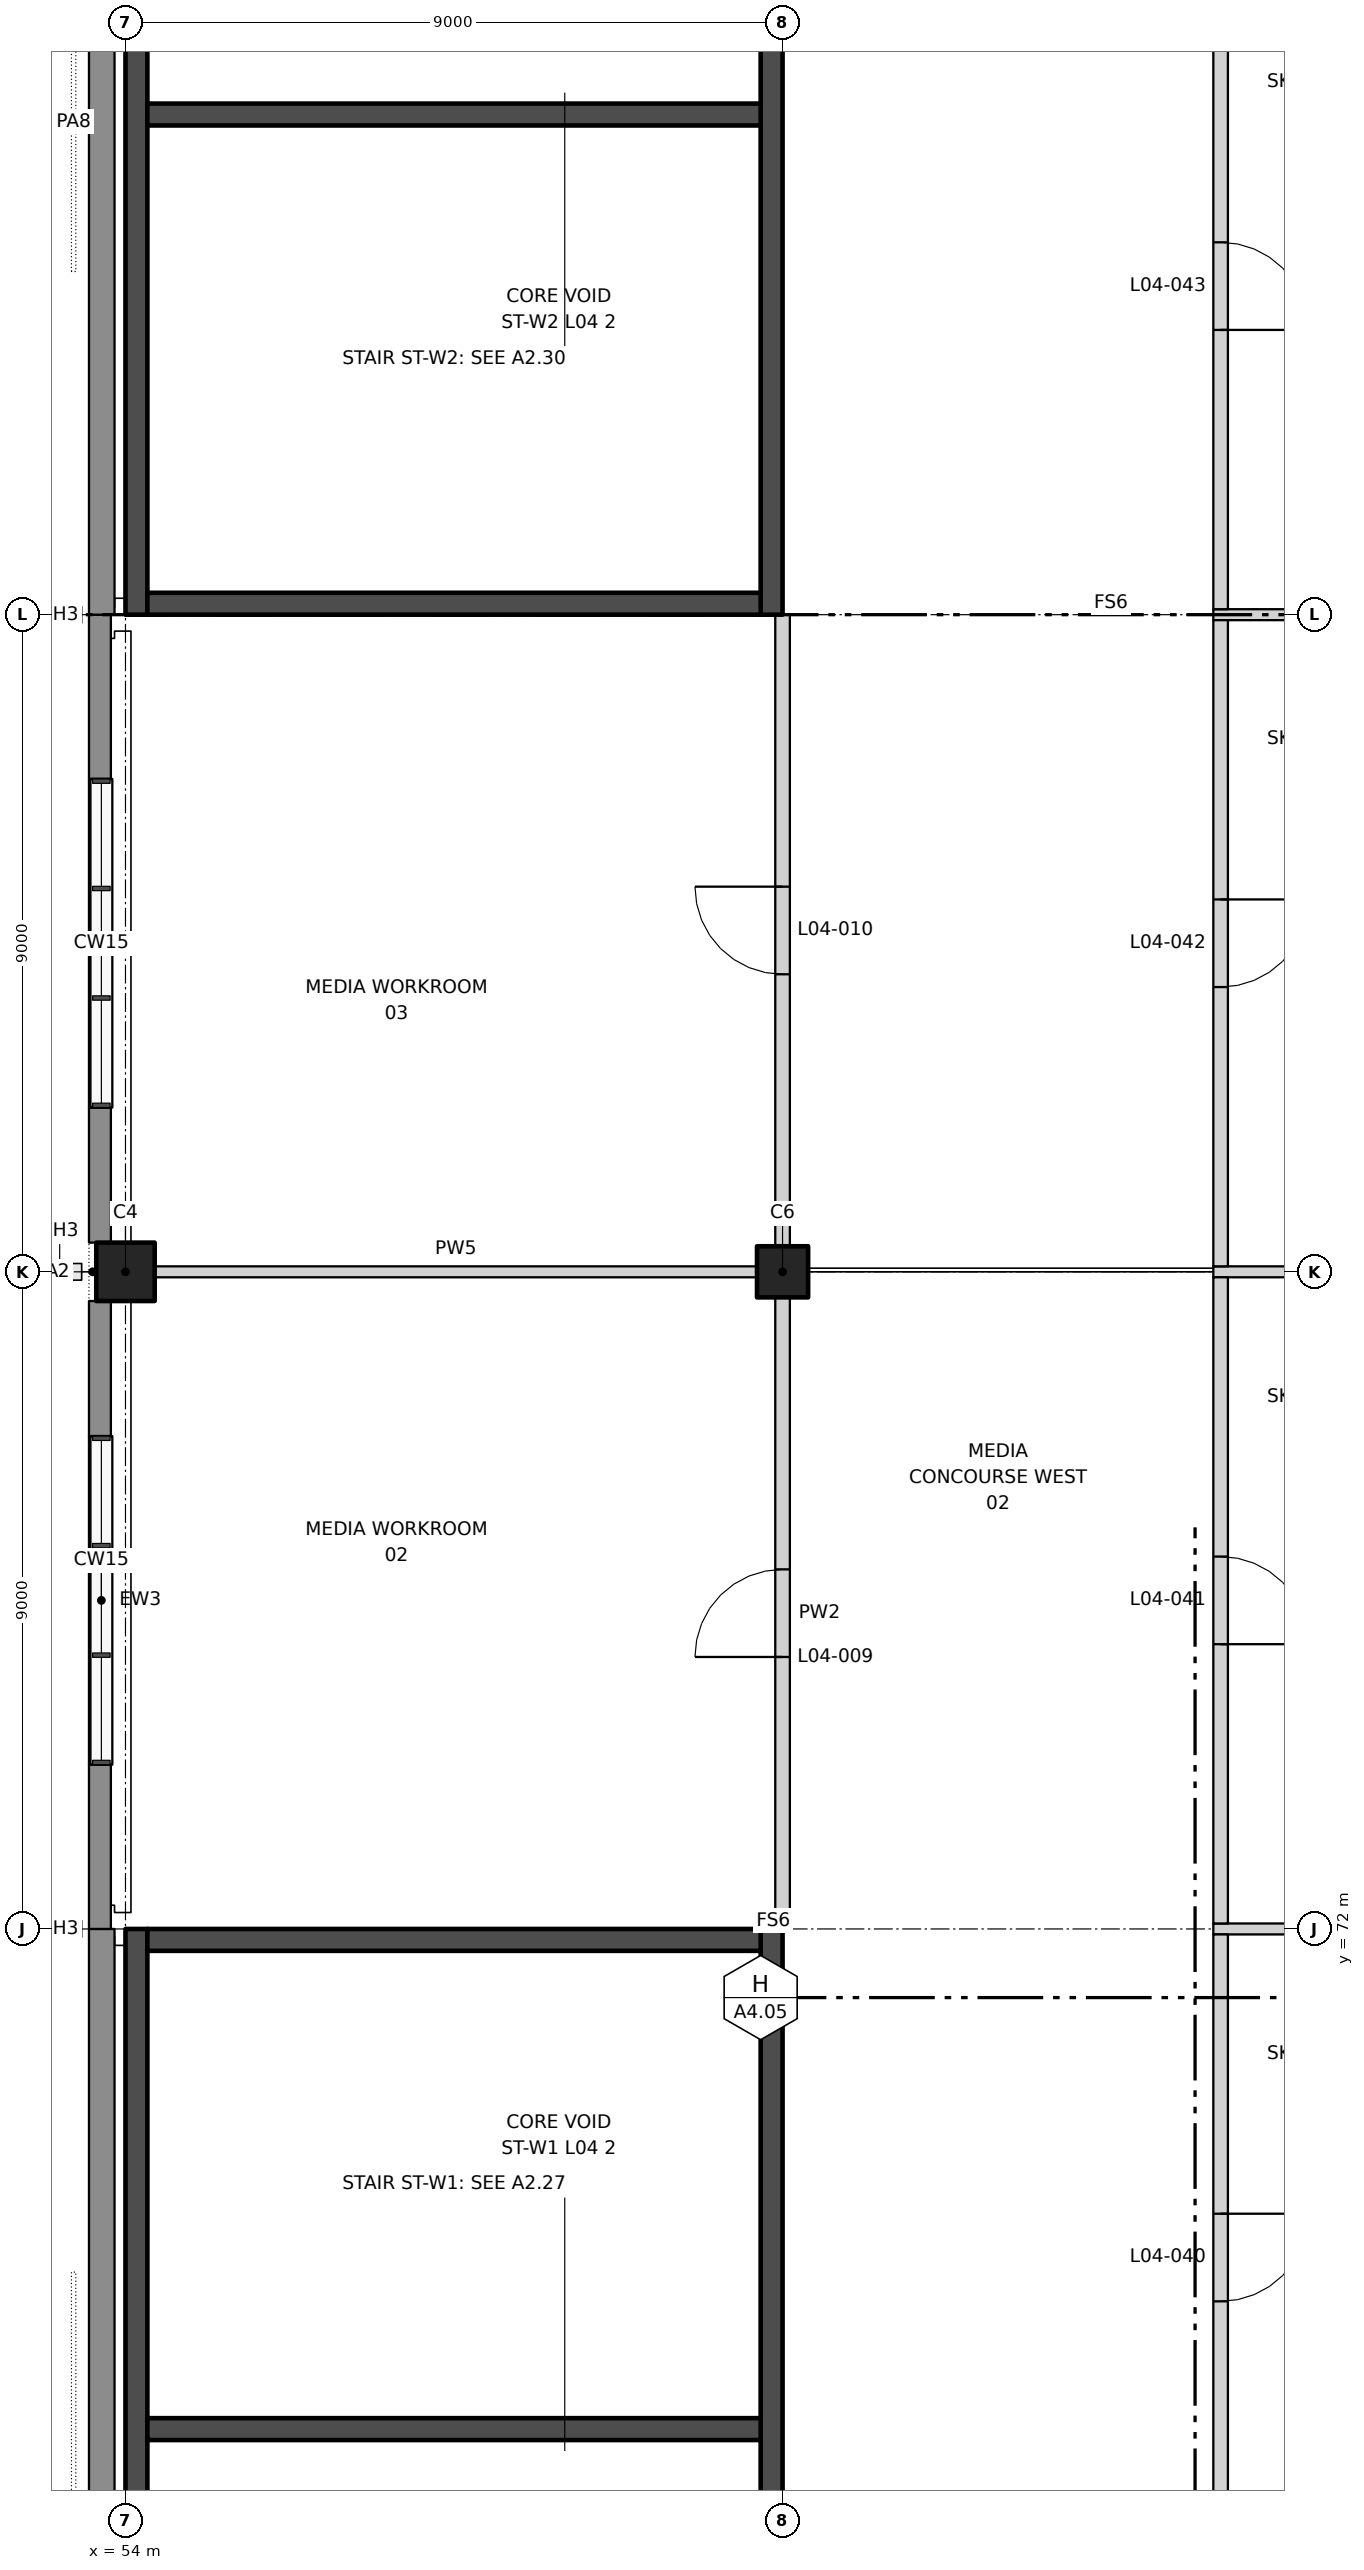
"""IFC4 building model, lengths in metres.
Left out: names, types, materials, properties, quantities, classifications, styles, units other than length and angle.
Written with IfcOpenShell. Run it as: python <this file> out.ifc"""

import sys

from ifc_helpers import new_model, si_unit, direction, frame, frame_2d, origin, origin_2d, place, context, subcontext, project, spatial, rectangle, extrude, element, fill, save


model = new_model("IFC4")
c1 = context("Model", 3, precision=1e-05, world=origin(), true_north=direction((0.0, 1.0)))
c2 = subcontext(c1, "Body", "Model", "MODEL_VIEW")
j1 = project(units=[si_unit("LENGTHUNIT", "METRE"), si_unit("PLANEANGLEUNIT", "RADIAN")], contexts=[c1])
p1 = place(None, origin())
s1 = spatial("IfcSite", under=j1, at=p1, CompositionType="ELEMENT")
p2 = place(p1, origin())
s2 = spatial("IfcBuilding", under=s1, at=p2, CompositionType="ELEMENT")
p3 = place(p2, frame((0.0, 0.0, 28.0)))
s3 = spatial("IfcBuildingStorey", under=s2, at=p3, CompositionType="ELEMENT", Elevation=28.0)
p4 = place(p3, frame((54.0, 81.0, 0.0), z_axis=(0.0, 0.0, 1.0), x_axis=(1.0, 0.0, 0.0)))
e1 = element("IfcColumn", 1, at=p4, inside=s3, PredefinedType="COLUMN", context=c2, shape_type="SweptSolid", body=[
    extrude(rectangle(XDim=0.8, YDim=0.8, at=origin_2d()), origin(), (0.0, 0.0, 1.0), 5.5),
])
p5 = place(p3, frame((63.0, 81.0, 0.0), z_axis=(0.0, 0.0, 1.0), x_axis=(1.0, 0.0, 0.0)))
e2 = element("IfcColumn", 2, at=p5, inside=s3, PredefinedType="COLUMN", context=c2, shape_type="SweptSolid", body=[
    extrude(rectangle(XDim=0.7, YDim=0.7, at=origin_2d()), origin(), (0.0, 0.0, 1.0), 5.5),
])
p6 = place(p3, frame((68.9, 72.0, 0.0), z_axis=(0.0, 0.0, 1.0), x_axis=(1.0, 0.0, 0.0)))
e3 = element("IfcWall", 3, at=p6, inside=s3, PredefinedType="PARTITIONING", context=c2, shape_type="SweptSolid", body=[
    extrude(rectangle(XDim=2.9, YDim=0.15, at=frame_2d((1.45, 0.0))), origin(), (0.0, 0.0, 1.0), 4.2),
])
p7 = place(p3, frame((54.4, 81.0, 0.0), z_axis=(0.0, 0.0, 1.0), x_axis=(1.0, 0.0, 0.0)))
e4 = element("IfcWall", 4, at=p7, inside=s3, PredefinedType="PARTITIONING", context=c2, shape_type="SweptSolid", body=[
    extrude(rectangle(XDim=8.25, YDim=0.15, at=frame_2d((4.125, 0.0))), origin(), (0.0, 0.0, 1.0), 9.5),
])
for number, where, z_axis, x_axis in (
    (5, (68.9, 81.0, 0.0), (0.0, 0.0, 1.0), (1.0, 0.0, 0.0)),
    (6, (68.9, 90.0, 0.0), (0.0, 0.0, 1.0), (1.0, 0.0, 0.0)),
):
    element("IfcWall", number, at=place(p3, frame(where, z_axis=z_axis, x_axis=x_axis)), inside=s3, PredefinedType="PARTITIONING", context=c2, shape_type="SweptSolid", body=[
        extrude(rectangle(XDim=2.9, YDim=0.15, at=frame_2d((1.45, 0.0))), origin(), (0.0, 0.0, 1.0), 4.2),
    ])
p8 = place(p3, frame((63.0, 72.0, 0.0), z_axis=(0.0, 0.0, 1.0), x_axis=(0.0, 1.0, 0.0)))
e7 = element("IfcWall", 7, at=p8, inside=s3, PredefinedType="PARTITIONING", context=c2, shape_type="SweptSolid", body=[
    extrude(rectangle(XDim=8.65, YDim=0.2, at=frame_2d((4.325, 0.0))), origin(), (0.0, 0.0, 1.0), 3.8),
])
p9 = place(p8, frame((3.725, 0.0, 0.0)))
e8 = element("IfcOpeningElement", 8, at=p9, cuts=e7, PredefinedType="OPENING", context=c2, shape_type="SweptSolid", body=[
    extrude(rectangle(XDim=1.2, YDim=2.1, at=frame_2d((0.6, 1.05))), frame((0.0, 0.11, 0.0), z_axis=(0.0, -1.0, 0.0), x_axis=(1.0, 0.0, 0.0)), (0.0, 0.0, 1.0), 0.22),
])
p10 = place(p3, frame((63.0, 81.35, 0.0), z_axis=(0.0, 0.0, 1.0), x_axis=(0.0, 1.0, 0.0)))
e9 = element("IfcWall", 9, at=p10, inside=s3, PredefinedType="PARTITIONING", context=c2, shape_type="SweptSolid", body=[
    extrude(rectangle(XDim=8.65, YDim=0.2, at=frame_2d((4.325, 0.0))), origin(), (0.0, 0.0, 1.0), 4.2),
])
p11 = place(p10, frame((3.725, 0.0, 0.0)))
e10 = element("IfcOpeningElement", 10, at=p11, cuts=e9, PredefinedType="OPENING", context=c2, shape_type="SweptSolid", body=[
    extrude(rectangle(XDim=1.2, YDim=2.1, at=frame_2d((0.6, 1.05))), frame((0.0, 0.11, 0.0), z_axis=(0.0, -1.0, 0.0), x_axis=(1.0, 0.0, 0.0)), (0.0, 0.0, 1.0), 0.22),
])
p12 = place(p3, frame((69.0, 63.075, 0.0), z_axis=(0.0, 0.0, 1.0), x_axis=(0.0, 1.0, 0.0)))
e11 = element("IfcWall", 11, at=p12, inside=s3, PredefinedType="PARTITIONING", context=c2, shape_type="SweptSolid", body=[
    extrude(rectangle(XDim=8.85, YDim=0.2, at=frame_2d((4.425, 0.0))), origin(), (0.0, 0.0, 1.0), 5.5),
])
p13 = place(p12, frame((3.825, 0.0, 0.0)))
e12 = element("IfcOpeningElement", 12, at=p13, cuts=e11, PredefinedType="OPENING", context=c2, shape_type="SweptSolid", body=[
    extrude(rectangle(XDim=1.2, YDim=2.1, at=frame_2d((0.6, 1.05))), frame((0.0, 0.11, 0.0), z_axis=(0.0, -1.0, 0.0), x_axis=(1.0, 0.0, 0.0)), (0.0, 0.0, 1.0), 0.22),
])
p14 = place(p3, frame((69.0, 72.075, 0.0), z_axis=(0.0, 0.0, 1.0), x_axis=(0.0, 1.0, 0.0)))
e13 = element("IfcWall", 13, at=p14, inside=s3, PredefinedType="PARTITIONING", context=c2, shape_type="SweptSolid", body=[
    extrude(rectangle(XDim=8.85, YDim=0.2, at=frame_2d((4.425, 0.0))), origin(), (0.0, 0.0, 1.0), 5.5),
])
p15 = place(p14, frame((3.825, 0.0, 0.0)))
e14 = element("IfcOpeningElement", 14, at=p15, cuts=e13, PredefinedType="OPENING", context=c2, shape_type="SweptSolid", body=[
    extrude(rectangle(XDim=1.2, YDim=2.1, at=frame_2d((0.6, 1.05))), frame((0.0, 0.11, 0.0), z_axis=(0.0, -1.0, 0.0), x_axis=(1.0, 0.0, 0.0)), (0.0, 0.0, 1.0), 0.22),
])
p16 = place(p3, frame((69.0, 81.075, 0.0), z_axis=(0.0, 0.0, 1.0), x_axis=(0.0, 1.0, 0.0)))
e15 = element("IfcWall", 15, at=p16, inside=s3, PredefinedType="PARTITIONING", context=c2, shape_type="SweptSolid", body=[
    extrude(rectangle(XDim=8.85, YDim=0.2, at=frame_2d((4.425, 0.0))), origin(), (0.0, 0.0, 1.0), 5.5),
])
p17 = place(p16, frame((3.825, 0.0, 0.0)))
e16 = element("IfcOpeningElement", 16, at=p17, cuts=e15, PredefinedType="OPENING", context=c2, shape_type="SweptSolid", body=[
    extrude(rectangle(XDim=1.2, YDim=2.1, at=frame_2d((0.6, 1.05))), frame((0.0, 0.11, 0.0), z_axis=(0.0, -1.0, 0.0), x_axis=(1.0, 0.0, 0.0)), (0.0, 0.0, 1.0), 0.22),
])
p18 = place(p3, frame((69.0, 90.075, 0.0), z_axis=(0.0, 0.0, 1.0), x_axis=(0.0, 1.0, 0.0)))
e17 = element("IfcWall", 17, at=p18, inside=s3, PredefinedType="PARTITIONING", context=c2, shape_type="SweptSolid", body=[
    extrude(rectangle(XDim=8.85, YDim=0.2, at=frame_2d((4.425, 0.0))), origin(), (0.0, 0.0, 1.0), 5.5),
])
p19 = place(p18, frame((3.825, 0.0, 0.0)))
e18 = element("IfcOpeningElement", 18, at=p19, cuts=e17, PredefinedType="OPENING", context=c2, shape_type="SweptSolid", body=[
    extrude(rectangle(XDim=1.2, YDim=2.1, at=frame_2d((0.6, 1.05))), frame((0.0, 0.11, 0.0), z_axis=(0.0, -1.0, 0.0), x_axis=(1.0, 0.0, 0.0)), (0.0, 0.0, 1.0), 0.22),
])
p20 = place(p3, frame((53.675, 72.0, 0.0), z_axis=(0.0, 0.0, 1.0), x_axis=(0.0, -1.0, 0.0)))
e19 = element("IfcWall", 19, at=p20, inside=s3, PredefinedType="SOLIDWALL", context=c2, shape_type="SweptSolid", body=[
    extrude(rectangle(XDim=9.0, YDim=0.35, at=frame_2d((4.5, 0.0))), origin(), (0.0, 0.0, 1.0), 5.5),
])
p21 = place(p3, frame((53.65, 74.25, 0.0), z_axis=(0.0, 0.0, 1.0), x_axis=(0.0, -1.0, 0.0)))
e20 = element("IfcWall", 20, at=p21, inside=s3, PredefinedType="SOLIDWALL", context=c2, shape_type="SweptSolid", body=[
    extrude(rectangle(XDim=2.25, YDim=0.3, at=frame_2d((1.125, 0.0))), origin(), (0.0, 0.0, 1.0), 4.9),
])
p22 = place(p3, frame((53.65, 80.6, 0.0), z_axis=(0.0, 0.0, 1.0), x_axis=(0.0, -1.0, 0.0)))
e21 = element("IfcWall", 21, at=p22, inside=s3, PredefinedType="SOLIDWALL", context=c2, shape_type="SweptSolid", body=[
    extrude(rectangle(XDim=1.85, YDim=0.3, at=frame_2d((0.925, 0.0))), origin(), (0.0, 0.0, 1.0), 4.9),
])
p23 = place(p3, frame((53.65, 78.75, 0.0), z_axis=(0.0, 0.0, 1.0), x_axis=(0.0, -1.0, 0.0)))
e22 = element("IfcWall", 22, at=p23, inside=s3, PredefinedType="SOLIDWALL", context=c2, shape_type="SweptSolid", body=[
    extrude(rectangle(XDim=4.5, YDim=0.3, at=frame_2d((2.25, 0.0))), origin(), (0.0, 0.0, 1.0), 1.0),
])
p24 = place(p3, frame((53.65, 83.25, 0.0), z_axis=(0.0, 0.0, 1.0), x_axis=(0.0, -1.0, 0.0)))
e23 = element("IfcWall", 23, at=p24, inside=s3, PredefinedType="SOLIDWALL", context=c2, shape_type="SweptSolid", body=[
    extrude(rectangle(XDim=1.85, YDim=0.3, at=frame_2d((0.925, 0.0))), origin(), (0.0, 0.0, 1.0), 4.9),
])
p25 = place(p3, frame((53.65, 90.0, 0.0), z_axis=(0.0, 0.0, 1.0), x_axis=(0.0, -1.0, 0.0)))
e24 = element("IfcWall", 24, at=p25, inside=s3, PredefinedType="SOLIDWALL", context=c2, shape_type="SweptSolid", body=[
    extrude(rectangle(XDim=2.25, YDim=0.3, at=frame_2d((1.125, 0.0))), origin(), (0.0, 0.0, 1.0), 4.9),
])
p26 = place(p3, frame((53.65, 87.75, 0.0), z_axis=(0.0, 0.0, 1.0), x_axis=(0.0, -1.0, 0.0)))
e25 = element("IfcWall", 25, at=p26, inside=s3, PredefinedType="SOLIDWALL", context=c2, shape_type="SweptSolid", body=[
    extrude(rectangle(XDim=4.5, YDim=0.3, at=frame_2d((2.25, 0.0))), origin(), (0.0, 0.0, 1.0), 1.0),
])
p27 = place(p3, frame((53.675, 99.0, 0.0), z_axis=(0.0, 0.0, 1.0), x_axis=(0.0, -1.0, 0.0)))
e26 = element("IfcWall", 26, at=p27, inside=s3, PredefinedType="SOLIDWALL", context=c2, shape_type="SweptSolid", body=[
    extrude(rectangle(XDim=9.0, YDim=0.35, at=frame_2d((4.5, 0.0))), origin(), (0.0, 0.0, 1.0), 5.5),
])
p28 = place(p3, frame((62.85, 54.0, 0.0), z_axis=(0.0, 0.0, 1.0), x_axis=(0.0, 1.0, 0.0)))
e27 = element("IfcWall", 27, at=p28, inside=s3, PredefinedType="SHEAR", context=c2, shape_type="SweptSolid", body=[
    extrude(rectangle(XDim=18.0, YDim=0.3, at=frame_2d((9.0, 0.0))), origin(), (0.0, 0.0, 1.0), 5.5),
])
p29 = place(p28, frame((1.5, 0.0, 0.0)))
e28 = element("IfcOpeningElement", 28, at=p29, cuts=e27, PredefinedType="OPENING", context=c2, shape_type="SweptSolid", body=[
    extrude(rectangle(XDim=1.2, YDim=2.1, at=frame_2d((0.6, 1.05))), frame((0.0, 0.16, 0.0), z_axis=(0.0, -1.0, 0.0), x_axis=(1.0, 0.0, 0.0)), (0.0, 0.0, 1.0), 0.32),
])
p30 = place(p3, frame((54.15, 54.0, 0.0), z_axis=(0.0, 0.0, 1.0), x_axis=(0.0, 1.0, 0.0)))
e29 = element("IfcWall", 29, at=p30, inside=s3, PredefinedType="SHEAR", context=c2, shape_type="SweptSolid", body=[
    extrude(rectangle(XDim=18.0, YDim=0.3, at=frame_2d((9.0, 0.0))), origin(), (0.0, 0.0, 1.0), 5.5),
])
for number, where, z_axis, x_axis in (
    (30, (62.7, 71.85, 0.0), (0.0, 0.0, 1.0), (-1.0, 0.0, 0.0)),
    (31, (62.7, 65.15, 0.0), (0.0, 0.0, 1.0), (-1.0, 0.0, 0.0)),
):
    element("IfcWall", number, at=place(p3, frame(where, z_axis=z_axis, x_axis=x_axis)), inside=s3, PredefinedType="SHEAR", context=c2, shape_type="SweptSolid", body=[
        extrude(rectangle(XDim=8.4, YDim=0.3, at=frame_2d((4.2, 0.0))), origin(), (0.0, 0.0, 1.0), 5.5),
    ])
p31 = place(p3, frame((62.85, 108.0, 0.0), z_axis=(0.0, 0.0, 1.0), x_axis=(0.0, -1.0, 0.0)))
e32 = element("IfcWall", 32, at=p31, inside=s3, PredefinedType="SHEAR", context=c2, shape_type="SweptSolid", body=[
    extrude(rectangle(XDim=18.0, YDim=0.3, at=frame_2d((9.0, 0.0))), origin(), (0.0, 0.0, 1.0), 5.5),
])
p32 = place(p31, frame((1.5, 0.0, 0.0)))
e33 = element("IfcOpeningElement", 33, at=p32, cuts=e32, PredefinedType="OPENING", context=c2, shape_type="SweptSolid", body=[
    extrude(rectangle(XDim=1.2, YDim=2.1, at=frame_2d((0.6, 1.05))), frame((0.0, 0.16, 0.0), z_axis=(0.0, -1.0, 0.0), x_axis=(1.0, 0.0, 0.0)), (0.0, 0.0, 1.0), 0.32),
])
p33 = place(p3, frame((54.15, 108.0, 0.0), z_axis=(0.0, 0.0, 1.0), x_axis=(0.0, -1.0, 0.0)))
e34 = element("IfcWall", 34, at=p33, inside=s3, PredefinedType="SHEAR", context=c2, shape_type="SweptSolid", body=[
    extrude(rectangle(XDim=18.0, YDim=0.3, at=frame_2d((9.0, 0.0))), origin(), (0.0, 0.0, 1.0), 5.5),
])
for number, where, z_axis, x_axis in (
    (35, (62.7, 90.15, 0.0), (0.0, 0.0, 1.0), (-1.0, 0.0, 0.0)),
    (36, (62.7, 96.85, 0.0), (0.0, 0.0, 1.0), (-1.0, 0.0, 0.0)),
):
    element("IfcWall", number, at=place(p3, frame(where, z_axis=z_axis, x_axis=x_axis)), inside=s3, PredefinedType="SHEAR", context=c2, shape_type="SweptSolid", body=[
        extrude(rectangle(XDim=8.4, YDim=0.3, at=frame_2d((4.2, 0.0))), origin(), (0.0, 0.0, 1.0), 5.5),
    ])
p34 = place(p9, origin())
e37 = element("IfcDoor", 37, at=p34, inside=s3, OperationType="SINGLE_SWING_LEFT", PredefinedType="DOOR", context=c2, shape_type="SweptSolid", body=[
    extrude(rectangle(XDim=1.2, YDim=2.1, at=frame_2d((0.6, 1.05))), frame((0.0, 0.025, 0.0), z_axis=(0.0, -1.0, 0.0), x_axis=(1.0, 0.0, 0.0)), (0.0, 0.0, 1.0), 0.05),
])
fill(e8, e37)
p35 = place(p11, origin())
e38 = element("IfcDoor", 38, at=p35, inside=s3, OperationType="SINGLE_SWING_RIGHT", PredefinedType="DOOR", context=c2, shape_type="SweptSolid", body=[
    extrude(rectangle(XDim=1.2, YDim=2.1, at=frame_2d((0.6, 1.05))), frame((0.0, 0.025, 0.0), z_axis=(0.0, -1.0, 0.0), x_axis=(1.0, 0.0, 0.0)), (0.0, 0.0, 1.0), 0.05),
])
fill(e10, e38)
p36 = place(p13, frame((1.2, 0.0, 0.0), z_axis=(0.0, 0.0, 1.0), x_axis=(-1.0, 0.0, 0.0)))
e39 = element("IfcDoor", 39, at=p36, inside=s3, OperationType="SINGLE_SWING_LEFT", PredefinedType="DOOR", context=c2, shape_type="SweptSolid", body=[
    extrude(rectangle(XDim=1.2, YDim=2.1, at=frame_2d((0.6, 1.05))), frame((0.0, 0.025, 0.0), z_axis=(0.0, -1.0, 0.0), x_axis=(1.0, 0.0, 0.0)), (0.0, 0.0, 1.0), 0.05),
])
fill(e12, e39)
p37 = place(p15, frame((1.2, 0.0, 0.0), z_axis=(0.0, 0.0, 1.0), x_axis=(-1.0, 0.0, 0.0)))
e40 = element("IfcDoor", 40, at=p37, inside=s3, OperationType="SINGLE_SWING_RIGHT", PredefinedType="DOOR", context=c2, shape_type="SweptSolid", body=[
    extrude(rectangle(XDim=1.2, YDim=2.1, at=frame_2d((0.6, 1.05))), frame((0.0, 0.025, 0.0), z_axis=(0.0, -1.0, 0.0), x_axis=(1.0, 0.0, 0.0)), (0.0, 0.0, 1.0), 0.05),
])
fill(e14, e40)
p38 = place(p17, frame((1.2, 0.0, 0.0), z_axis=(0.0, 0.0, 1.0), x_axis=(-1.0, 0.0, 0.0)))
e41 = element("IfcDoor", 41, at=p38, inside=s3, OperationType="SINGLE_SWING_LEFT", PredefinedType="DOOR", context=c2, shape_type="SweptSolid", body=[
    extrude(rectangle(XDim=1.2, YDim=2.1, at=frame_2d((0.6, 1.05))), frame((0.0, 0.025, 0.0), z_axis=(0.0, -1.0, 0.0), x_axis=(1.0, 0.0, 0.0)), (0.0, 0.0, 1.0), 0.05),
])
fill(e16, e41)
p39 = place(p19, frame((1.2, 0.0, 0.0), z_axis=(0.0, 0.0, 1.0), x_axis=(-1.0, 0.0, 0.0)))
e42 = element("IfcDoor", 42, at=p39, inside=s3, OperationType="SINGLE_SWING_RIGHT", PredefinedType="DOOR", context=c2, shape_type="SweptSolid", body=[
    extrude(rectangle(XDim=1.2, YDim=2.1, at=frame_2d((0.6, 1.05))), frame((0.0, 0.025, 0.0), z_axis=(0.0, -1.0, 0.0), x_axis=(1.0, 0.0, 0.0)), (0.0, 0.0, 1.0), 0.05),
])
fill(e18, e42)
save(model, sys.argv[1])
